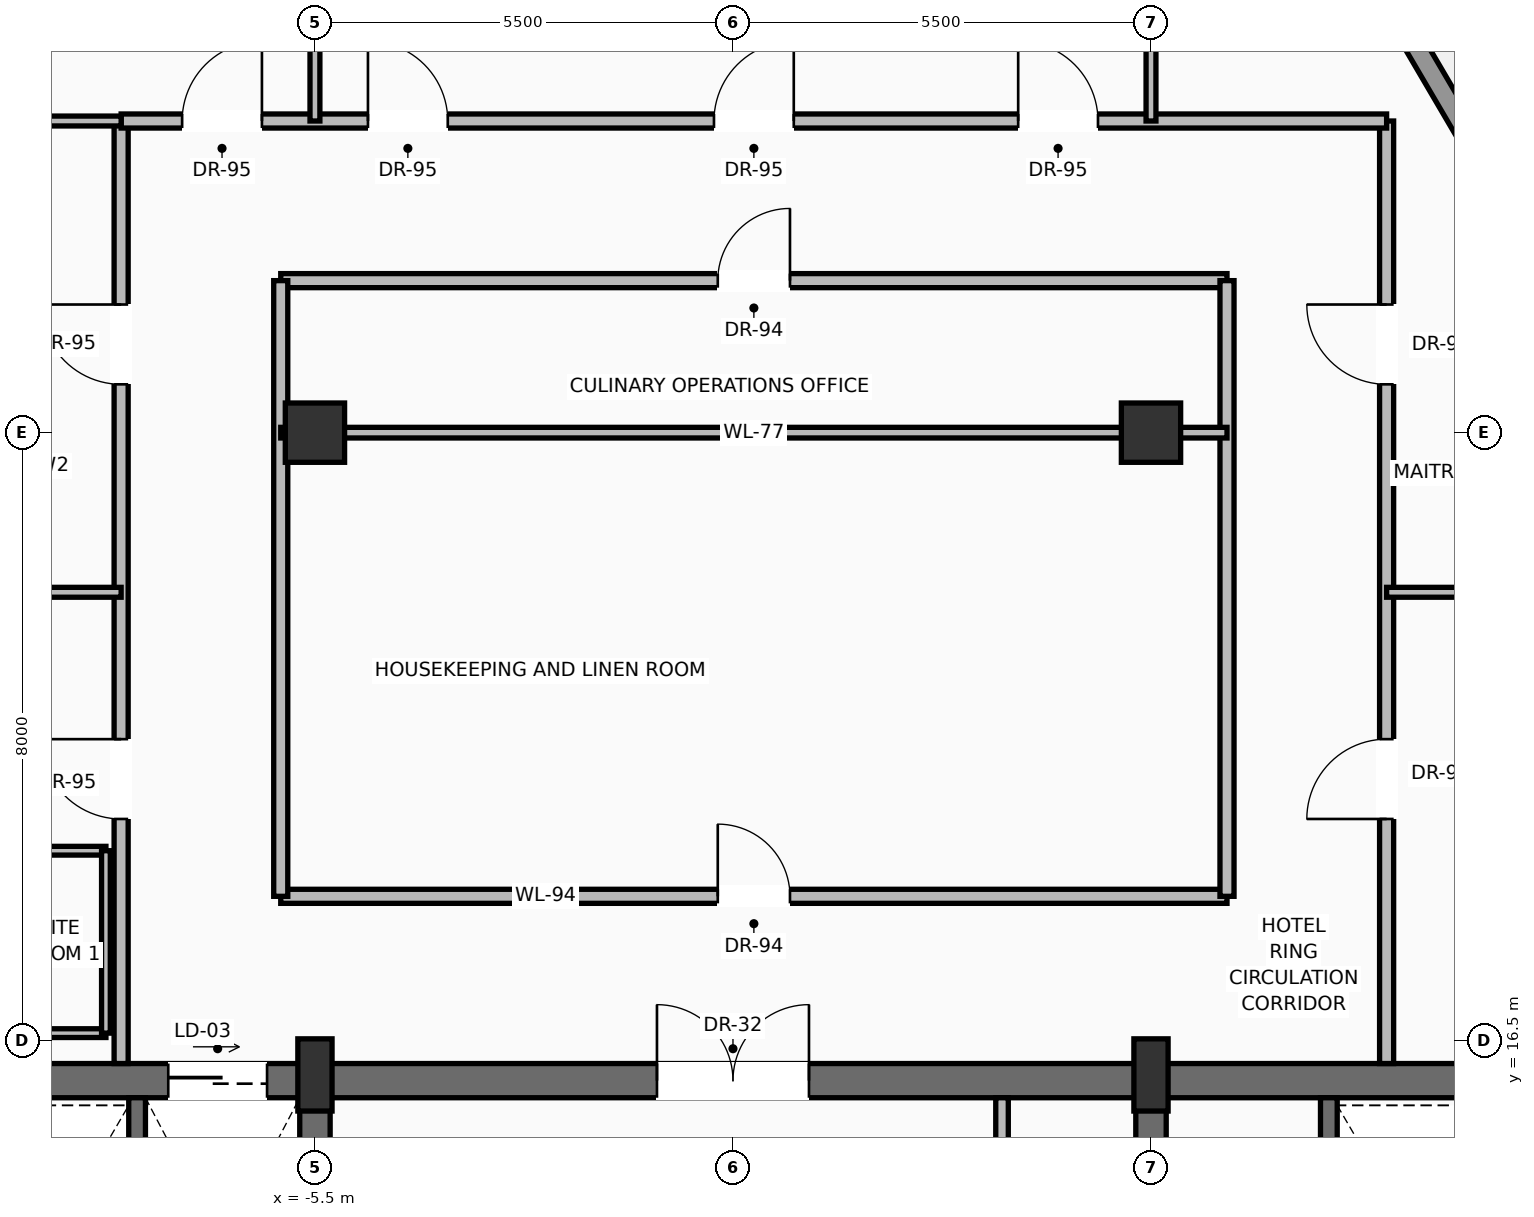
"""IFC4 building model, lengths in metres.
Left out: names, types, materials, properties, quantities, classifications, styles, units other than length and angle.
Written with IfcOpenShell. Run it as: python <this file> out.ifc"""

import sys

from ifc_helpers import new_model, si_unit, direction, frame, frame_2d, origin, origin_2d, place, context, subcontext, project, spatial, rectangle, extrude, source, transform, mapped, element, fill, save


model = new_model("IFC4")
c1 = context("Model", 3, precision=1e-05, world=origin(), true_north=direction((0.0, 1.0)))
c2 = subcontext(c1, "Body", "Model", "MODEL_VIEW")
j1 = project(units=[si_unit("LENGTHUNIT", "METRE"), si_unit("PLANEANGLEUNIT", "RADIAN")], contexts=[c1])
p1 = place(None, origin())
s1 = spatial("IfcSite", under=j1, at=p1, CompositionType="ELEMENT")
p2 = place(p1, origin())
s2 = spatial("IfcBuilding", under=s1, at=p2, CompositionType="ELEMENT")
p3 = place(p2, frame((0.0, 0.0, 283.35)))
s3 = spatial("IfcBuildingStorey", under=s2, at=p3, CompositionType="ELEMENT", Elevation=283.35)
p4 = place(p3, frame((-10.6, 15.975, 0.0), z_axis=(0.0, 0.0, 1.0), x_axis=(1.0, 0.0, 0.0)))
e1 = element("IfcWall", 1, at=p4, inside=s3, PredefinedType="SHEAR", context=c2, shape_type="SweptSolid", body=[
    extrude(rectangle(XDim=21.2, YDim=0.45, at=frame_2d((10.6, 0.0))), origin(), (0.0, 0.0, 1.0), 3.24),
])
p5 = place(p4, frame((3.17, 0.0, 0.0)))
e2 = element("IfcOpeningElement", 2, at=p5, cuts=e1, PredefinedType="OPENING", context=c2, shape_type="SweptSolid", body=[
    extrude(rectangle(XDim=1.3, YDim=2.3, at=frame_2d((0.65, 1.15))), frame((0.0, 0.235, 0.0), z_axis=(0.0, -1.0, 0.0), x_axis=(1.0, 0.0, 0.0)), (0.0, 0.0, 1.0), 0.47),
])
p6 = place(p4, frame((9.6, 0.0, 0.0)))
e3 = element("IfcOpeningElement", 3, at=p6, cuts=e1, PredefinedType="OPENING", context=c2, shape_type="SweptSolid", body=[
    extrude(rectangle(XDim=2.0, YDim=2.4, at=frame_2d((1.0, 1.2))), frame((0.0, 0.235, 0.0), z_axis=(0.0, -1.0, 0.0), x_axis=(1.0, 0.0, 0.0)), (0.0, 0.0, 1.0), 0.47),
])
p7 = place(p3, frame((-5.5, 0.625, 0.0), z_axis=(0.0, 0.0, 1.0), x_axis=(0.0, 1.0, 0.0)))
e4 = element("IfcWall", 4, at=p7, inside=s3, PredefinedType="SHEAR", context=c2, shape_type="SweptSolid", body=[
    extrude(rectangle(XDim=15.35, YDim=0.4, at=frame_2d((7.675, 0.0))), origin(), (0.0, 0.0, 1.0), 3.24),
])
p8 = place(p7, frame((8.875, 0.0, 0.0)))
e5 = element("IfcOpeningElement", 5, at=p8, cuts=e4, PredefinedType="OPENING", context=c2, shape_type="SweptSolid", body=[
    extrude(rectangle(XDim=1.1, YDim=2.2, at=frame_2d((0.55, 1.1))), frame((0.0, 0.21, 0.0), z_axis=(0.0, -1.0, 0.0), x_axis=(1.0, 0.0, 0.0)), (0.0, 0.0, 1.0), 0.42),
])
p9 = place(p3, frame((5.5, 0.625, 0.0), z_axis=(0.0, 0.0, 1.0), x_axis=(0.0, 1.0, 0.0)))
e6 = element("IfcWall", 6, at=p9, inside=s3, PredefinedType="SHEAR", context=c2, shape_type="SweptSolid", body=[
    extrude(rectangle(XDim=15.35, YDim=0.4, at=frame_2d((7.675, 0.0))), origin(), (0.0, 0.0, 1.0), 3.24),
])
p10 = place(p9, frame((8.875, 0.0, 0.0)))
e7 = element("IfcOpeningElement", 7, at=p10, cuts=e6, PredefinedType="OPENING", context=c2, shape_type="SweptSolid", body=[
    extrude(rectangle(XDim=1.1, YDim=2.2, at=frame_2d((0.55, 1.1))), frame((0.0, 0.21, 0.0), z_axis=(0.0, -1.0, 0.0), x_axis=(1.0, 0.0, 0.0)), (0.0, 0.0, 1.0), 0.42),
])
m1 = source(origin(), c2, "Body", "SweptSolid", [
    extrude(rectangle(XDim=0.45, YDim=0.95, at=origin_2d()), origin(), (0.0, 0.0, 1.0), 3.45),
])
for number, where, z_axis, x_axis in (
    (8, (-5.5, 16.05, 0.0), (0.0, 0.0, 1.0), (1.0, 0.0, 0.0)),
    (9, (5.5, 16.05, 0.0), (0.0, 0.0, 1.0), (1.0, 0.0, 0.0)),
):
    element("IfcColumn", number, at=place(p3, frame(where, z_axis=z_axis, x_axis=x_axis)), inside=s3, PredefinedType="PILASTER", context=c2, shape_type="MappedRepresentation", body=[
        mapped(m1, transform((0.0, 0.0, 0.0), scale=1.0)),
    ])
m2 = source(origin(), c2, "Body", "SweptSolid", [
    extrude(rectangle(XDim=0.78, YDim=0.78, at=origin_2d()), origin(), (0.0, 0.0, 1.0), 3.45),
])
for number, where, z_axis, x_axis in (
    (10, (-5.5, 24.5, 0.0), (0.0, 0.0, 1.0), (1.0, 0.0, 0.0)),
    (11, (5.5, 24.5, 0.0), (0.0, 0.0, 1.0), (1.0, 0.0, 0.0)),
):
    element("IfcColumn", number, at=place(p3, frame(where, z_axis=z_axis, x_axis=x_axis)), inside=s3, PredefinedType="COLUMN", context=c2, shape_type="MappedRepresentation", body=[
        mapped(m2, transform((0.0, 0.0, 0.0), scale=1.0)),
    ])
p11 = place(p3, frame((-18.245, 14.072, 0.0), z_axis=(0.0, 0.0, 1.0), x_axis=(0.499006273731, 0.866598372244, 0.0)))
e12 = element("IfcWall", 12, at=p11, inside=s3, PredefinedType="SOLIDWALL", context=c2, shape_type="SweptSolid", body=[
    extrude(rectangle(XDim=20.19, YDim=0.28, at=frame_2d((10.095, 0.0))), origin(), (0.0, 0.0, 1.0), 2.82),
])
p12 = place(p11, frame((4.846, 0.0, 0.0)))
e13 = element("IfcOpeningElement", 13, at=p12, cuts=e12, PredefinedType="OPENING", context=c2, shape_type="SweptSolid", body=[
    extrude(rectangle(XDim=1.6, YDim=2.35, at=frame_2d((0.8, 1.175))), frame((0.0, 0.15, 0.0), z_axis=(0.0, -1.0, 0.0), x_axis=(1.0, 0.0, 0.0)), (0.0, 0.0, 1.0), 0.3),
])
p13 = place(p11, frame((13.729, 0.0, 0.9)))
e14 = element("IfcOpeningElement", 14, at=p13, cuts=e12, PredefinedType="OPENING", context=c2, shape_type="SweptSolid", body=[
    extrude(rectangle(XDim=2.0, YDim=1.75, at=frame_2d((1.0, 0.875))), frame((0.0, 0.15, 0.0), z_axis=(0.0, -1.0, 0.0), x_axis=(1.0, 0.0, 0.0)), (0.0, 0.0, 1.0), 0.3),
])
p14 = place(p3, frame((7.752, 31.686, 0.0), z_axis=(0.0, 0.0, 1.0), x_axis=(0.506132125438, -0.862455953426, 0.0)))
e15 = element("IfcWall", 15, at=p14, inside=s3, PredefinedType="SOLIDWALL", context=c2, shape_type="SweptSolid", body=[
    extrude(rectangle(XDim=20.071, YDim=0.28, at=frame_2d((10.036, 0.0))), origin(), (0.0, 0.0, 1.0), 2.82),
])
p15 = place(p14, frame((4.817, 0.0, 0.0)))
e16 = element("IfcOpeningElement", 16, at=p15, cuts=e15, PredefinedType="OPENING", context=c2, shape_type="SweptSolid", body=[
    extrude(rectangle(XDim=1.6, YDim=2.35, at=frame_2d((0.8, 1.175))), frame((0.0, 0.15, 0.0), z_axis=(0.0, -1.0, 0.0), x_axis=(1.0, 0.0, 0.0)), (0.0, 0.0, 1.0), 0.3),
])
p16 = place(p14, frame((13.648, 0.0, 0.9)))
e17 = element("IfcOpeningElement", 17, at=p16, cuts=e15, PredefinedType="OPENING", context=c2, shape_type="SweptSolid", body=[
    extrude(rectangle(XDim=2.0, YDim=1.75, at=frame_2d((1.0, 0.875))), frame((0.0, 0.15, 0.0), z_axis=(0.0, -1.0, 0.0), x_axis=(1.0, 0.0, 0.0)), (0.0, 0.0, 1.0), 0.3),
])
for number, where, z_axis, x_axis in (
    (18, (-7.84, 11.87, 0.0), (0.0, 0.0, 1.0), (0.0, 1.0, 0.0)),
    (19, (7.84, 11.87, 0.0), (0.0, 0.0, 1.0), (0.0, 1.0, 0.0)),
):
    element("IfcWall", number, at=place(p3, frame(where, z_axis=z_axis, x_axis=x_axis)), inside=s3, PredefinedType="SOLIDWALL", context=c2, shape_type="SweptSolid", body=[
        extrude(rectangle(XDim=3.88, YDim=0.22, at=frame_2d((1.94, 0.0))), origin(), (0.0, 0.0, 1.0), 3.24),
    ])
p17 = place(p3, frame((3.54, 11.22, 0.0), z_axis=(0.0, 0.0, 1.0), x_axis=(0.0, 1.0, 0.0)))
e20 = element("IfcWall", 20, at=p17, inside=s3, PredefinedType="PARTITIONING", context=c2, shape_type="SweptSolid", body=[
    extrude(rectangle(XDim=4.53, YDim=0.165, at=frame_2d((2.265, 0.0))), origin(), (0.0, 0.0, 1.0), 3.232),
])
p18 = place(p17, frame((1.25, 0.0, 0.0)))
e21 = element("IfcOpeningElement", 21, at=p18, cuts=e20, PredefinedType="OPENING", context=c2, shape_type="SweptSolid", body=[
    extrude(rectangle(XDim=0.9, YDim=2.1, at=frame_2d((0.45, 1.05))), frame((0.0, 0.093, 0.0), z_axis=(0.0, -1.0, 0.0), x_axis=(1.0, 0.0, 0.0)), (0.0, 0.0, 1.0), 0.185),
])
p19 = place(p3, frame((-5.95, 18.4, 0.0), z_axis=(0.0, 0.0, 1.0), x_axis=(1.0, 0.0, 0.0)))
e22 = element("IfcWall", 22, at=p19, inside=s3, PredefinedType="PARTITIONING", context=c2, shape_type="SweptSolid", body=[
    extrude(rectangle(XDim=12.45, YDim=0.185, at=frame_2d((6.225, 0.0))), origin(), (0.0, 0.0, 1.0), 3.232),
])
p20 = place(p19, frame((5.75, 0.0, 0.0)))
e23 = element("IfcOpeningElement", 23, at=p20, cuts=e22, PredefinedType="OPENING", context=c2, shape_type="SweptSolid", body=[
    extrude(rectangle(XDim=0.95, YDim=2.2, at=frame_2d((0.475, 1.1))), frame((0.0, 0.103, 0.0), z_axis=(0.0, -1.0, 0.0), x_axis=(1.0, 0.0, 0.0)), (0.0, 0.0, 1.0), 0.205),
])
p21 = place(p3, frame((-5.95, 26.5, 0.0), z_axis=(0.0, 0.0, 1.0), x_axis=(1.0, 0.0, 0.0)))
e24 = element("IfcWall", 24, at=p21, inside=s3, PredefinedType="PARTITIONING", context=c2, shape_type="SweptSolid", body=[
    extrude(rectangle(XDim=12.45, YDim=0.185, at=frame_2d((6.225, 0.0))), origin(), (0.0, 0.0, 1.0), 3.232),
])
p22 = place(p21, frame((5.75, 0.0, 0.0)))
e25 = element("IfcOpeningElement", 25, at=p22, cuts=e24, PredefinedType="OPENING", context=c2, shape_type="SweptSolid", body=[
    extrude(rectangle(XDim=0.95, YDim=2.2, at=frame_2d((0.475, 1.1))), frame((0.0, 0.103, 0.0), z_axis=(0.0, -1.0, 0.0), x_axis=(1.0, 0.0, 0.0)), (0.0, 0.0, 1.0), 0.205),
])
for number, where, z_axis, x_axis in (
    (26, (-5.95, 18.4, 0.0), (0.0, 0.0, 1.0), (0.0, 1.0, 0.0)),
    (27, (6.5, 18.4, 0.0), (0.0, 0.0, 1.0), (0.0, 1.0, 0.0)),
):
    element("IfcWall", number, at=place(p3, frame(where, z_axis=z_axis, x_axis=x_axis)), inside=s3, PredefinedType="PARTITIONING", context=c2, shape_type="SweptSolid", body=[
        extrude(rectangle(XDim=8.1, YDim=0.185, at=frame_2d((4.05, 0.0))), origin(), (0.0, 0.0, 1.0), 3.232),
    ])
p23 = place(p3, frame((-8.05, 16.2, 0.0), z_axis=(0.0, 0.0, 1.0), x_axis=(0.0, 1.0, 0.0)))
e28 = element("IfcWall", 28, at=p23, inside=s3, PredefinedType="PARTITIONING", context=c2, shape_type="SweptSolid", body=[
    extrude(rectangle(XDim=12.4, YDim=0.185, at=frame_2d((6.2, 0.0))), origin(), (0.0, 0.0, 1.0), 3.232),
])
p24 = place(p23, frame((3.218, 0.0, 0.0)))
e29 = element("IfcOpeningElement", 29, at=p24, cuts=e28, PredefinedType="OPENING", context=c2, shape_type="SweptSolid", body=[
    extrude(rectangle(XDim=1.05, YDim=2.25, at=frame_2d((0.525, 1.125))), frame((0.0, 0.103, 0.0), z_axis=(0.0, -1.0, 0.0), x_axis=(1.0, 0.0, 0.0)), (0.0, 0.0, 1.0), 0.205),
])
p25 = place(p23, frame((8.936, 0.0, 0.0)))
e30 = element("IfcOpeningElement", 30, at=p25, cuts=e28, PredefinedType="OPENING", context=c2, shape_type="SweptSolid", body=[
    extrude(rectangle(XDim=1.05, YDim=2.25, at=frame_2d((0.525, 1.125))), frame((0.0, 0.103, 0.0), z_axis=(0.0, -1.0, 0.0), x_axis=(1.0, 0.0, 0.0)), (0.0, 0.0, 1.0), 0.205),
])
p26 = place(p3, frame((8.6, 16.2, 0.0), z_axis=(0.0, 0.0, 1.0), x_axis=(0.0, 1.0, 0.0)))
e31 = element("IfcWall", 31, at=p26, inside=s3, PredefinedType="PARTITIONING", context=c2, shape_type="SweptSolid", body=[
    extrude(rectangle(XDim=12.4, YDim=0.185, at=frame_2d((6.2, 0.0))), origin(), (0.0, 0.0, 1.0), 3.232),
])
p27 = place(p26, frame((3.218, 0.0, 0.0)))
e32 = element("IfcOpeningElement", 32, at=p27, cuts=e31, PredefinedType="OPENING", context=c2, shape_type="SweptSolid", body=[
    extrude(rectangle(XDim=1.05, YDim=2.25, at=frame_2d((0.525, 1.125))), frame((0.0, 0.103, 0.0), z_axis=(0.0, -1.0, 0.0), x_axis=(1.0, 0.0, 0.0)), (0.0, 0.0, 1.0), 0.205),
])
p28 = place(p26, frame((8.936, 0.0, 0.0)))
e33 = element("IfcOpeningElement", 33, at=p28, cuts=e31, PredefinedType="OPENING", context=c2, shape_type="SweptSolid", body=[
    extrude(rectangle(XDim=1.05, YDim=2.25, at=frame_2d((0.525, 1.125))), frame((0.0, 0.103, 0.0), z_axis=(0.0, -1.0, 0.0), x_axis=(1.0, 0.0, 0.0)), (0.0, 0.0, 1.0), 0.205),
])
p29 = place(p3, frame((-8.05, 28.6, 0.0), z_axis=(0.0, 0.0, 1.0), x_axis=(1.0, 0.0, 0.0)))
e34 = element("IfcWall", 34, at=p29, inside=s3, PredefinedType="PARTITIONING", context=c2, shape_type="SweptSolid", body=[
    extrude(rectangle(XDim=16.65, YDim=0.185, at=frame_2d((8.325, 0.0))), origin(), (0.0, 0.0, 1.0), 3.232),
])
p30 = place(p29, frame((3.248, 0.0, 0.0)))
e35 = element("IfcOpeningElement", 35, at=p30, cuts=e34, PredefinedType="OPENING", context=c2, shape_type="SweptSolid", body=[
    extrude(rectangle(XDim=1.05, YDim=2.25, at=frame_2d((0.525, 1.125))), frame((0.0, 0.103, 0.0), z_axis=(0.0, -1.0, 0.0), x_axis=(1.0, 0.0, 0.0)), (0.0, 0.0, 1.0), 0.205),
])
p31 = place(p29, frame((7.8, 0.0, 0.0)))
e36 = element("IfcOpeningElement", 36, at=p31, cuts=e34, PredefinedType="OPENING", context=c2, shape_type="SweptSolid", body=[
    extrude(rectangle(XDim=1.05, YDim=2.25, at=frame_2d((0.525, 1.125))), frame((0.0, 0.103, 0.0), z_axis=(0.0, -1.0, 0.0), x_axis=(1.0, 0.0, 0.0)), (0.0, 0.0, 1.0), 0.205),
])
p32 = place(p29, frame((11.802, 0.0, 0.0)))
e37 = element("IfcOpeningElement", 37, at=p32, cuts=e34, PredefinedType="OPENING", context=c2, shape_type="SweptSolid", body=[
    extrude(rectangle(XDim=1.05, YDim=2.25, at=frame_2d((0.525, 1.125))), frame((0.0, 0.103, 0.0), z_axis=(0.0, -1.0, 0.0), x_axis=(1.0, 0.0, 0.0)), (0.0, 0.0, 1.0), 0.205),
])
p33 = place(p29, frame((0.802, 0.0, 0.0)))
e38 = element("IfcOpeningElement", 38, at=p33, cuts=e34, PredefinedType="OPENING", context=c2, shape_type="SweptSolid", body=[
    extrude(rectangle(XDim=1.05, YDim=2.25, at=frame_2d((0.525, 1.125))), frame((0.0, 0.103, 0.0), z_axis=(0.0, -1.0, 0.0), x_axis=(1.0, 0.0, 0.0)), (0.0, 0.0, 1.0), 0.205),
])
p34 = place(p3, frame((-5.95, 24.5, 0.0), z_axis=(0.0, 0.0, 1.0), x_axis=(1.0, 0.0, 0.0)))
e39 = element("IfcWall", 39, at=p34, inside=s3, PredefinedType="PARTITIONING", context=c2, shape_type="SweptSolid", body=[
    extrude(rectangle(XDim=12.45, YDim=0.14, at=frame_2d((6.225, 0.0))), origin(), (0.0, 0.0, 1.0), 2.683),
])
p35 = place(p3, frame((-10.029, 28.6, 0.0), z_axis=(0.0, 0.0, 1.0), x_axis=(1.0, 0.0, 0.0)))
e40 = element("IfcWall", 40, at=p35, inside=s3, PredefinedType="PARTITIONING", context=c2, shape_type="SweptSolid", body=[
    extrude(rectangle(XDim=1.979, YDim=0.13, at=frame_2d((0.989, 0.0))), origin(), (0.0, 0.0, 1.0), 3.232),
])
p36 = place(p3, frame((-5.5, 28.6, 0.0), z_axis=(0.0, 0.0, 1.0), x_axis=(0.0, 1.0, 0.0)))
e41 = element("IfcWall", 41, at=p36, inside=s3, PredefinedType="PARTITIONING", context=c2, shape_type="SweptSolid", body=[
    extrude(rectangle(XDim=7.865, YDim=0.13, at=frame_2d((3.932, 0.0))), origin(), (0.0, 0.0, 1.0), 2.683),
])
p37 = place(p3, frame((5.5, 28.6, 0.0), z_axis=(0.0, 0.0, 1.0), x_axis=(0.0, 1.0, 0.0)))
e42 = element("IfcWall", 42, at=p37, inside=s3, PredefinedType="PARTITIONING", context=c2, shape_type="SweptSolid", body=[
    extrude(rectangle(XDim=7.18, YDim=0.13, at=frame_2d((3.59, 0.0))), origin(), (0.0, 0.0, 1.0), 2.683),
])
for number, where, z_axis, x_axis in (
    (43, (-10.9, 16.6, 0.0), (0.0, 0.0, 1.0), (1.0, 0.0, 0.0)),
    (44, (-10.9, 19.0, 0.0), (0.0, 0.0, 1.0), (1.0, 0.0, 0.0)),
):
    element("IfcWall", number, at=place(p3, frame(where, z_axis=z_axis, x_axis=x_axis)), inside=s3, PredefinedType="PARTITIONING", context=c2, shape_type="SweptSolid", body=[
        extrude(rectangle(XDim=2.65, YDim=0.115, at=frame_2d((1.325, 0.0))), origin(), (0.0, 0.0, 1.0), 3.232),
    ])
p38 = place(p3, frame((-8.25, 16.6, 0.0), z_axis=(0.0, 0.0, 1.0), x_axis=(0.0, 1.0, 0.0)))
e45 = element("IfcWall", 45, at=p38, inside=s3, PredefinedType="PARTITIONING", context=c2, shape_type="SweptSolid", body=[
    extrude(rectangle(XDim=2.4, YDim=0.115, at=frame_2d((1.2, 0.0))), origin(), (0.0, 0.0, 1.0), 3.232),
])
p39 = place(p3, frame((-13.599, 22.4, 0.0), z_axis=(0.0, 0.0, 1.0), x_axis=(1.0, 0.0, 0.0)))
e46 = element("IfcWall", 46, at=p39, inside=s3, PredefinedType="PARTITIONING", context=c2, shape_type="SweptSolid", body=[
    extrude(rectangle(XDim=5.549, YDim=0.13, at=frame_2d((2.774, 0.0))), origin(), (0.0, 0.0, 1.0), 3.232),
])
p40 = place(p3, frame((8.6, 22.4, 0.0), z_axis=(0.0, 0.0, 1.0), x_axis=(1.0, 0.0, 0.0)))
e47 = element("IfcWall", 47, at=p40, inside=s3, PredefinedType="PARTITIONING", context=c2, shape_type="SweptSolid", body=[
    extrude(rectangle(XDim=4.752, YDim=0.13, at=frame_2d((2.376, 0.0))), origin(), (0.0, 0.0, 1.0), 3.232),
])
m3 = source(origin(), c2, "Body", "SweptSolid", [
    extrude(rectangle(XDim=1.3, YDim=2.3, at=frame_2d((0.65, 1.15))), frame((0.0, 0.025, 0.0), z_axis=(0.0, -1.0, 0.0), x_axis=(1.0, 0.0, 0.0)), (0.0, 0.0, 1.0), 0.05),
])
p41 = place(p5, origin())
e48 = element("IfcDoor", 48, at=p41, inside=s3, OperationType="SLIDING_TO_RIGHT", PredefinedType="DOOR", context=c2, shape_type="MappedRepresentation", body=[
    mapped(m3, transform((0.0, 0.0, 0.0), scale=1.0)),
])
fill(e2, e48)
m4 = source(origin(), c2, "Body", "SweptSolid", [
    extrude(rectangle(XDim=2.0, YDim=2.4, at=frame_2d((1.0, 1.2))), frame((0.0, 0.025, 0.0), z_axis=(0.0, -1.0, 0.0), x_axis=(1.0, 0.0, 0.0)), (0.0, 0.0, 1.0), 0.05),
])
p42 = place(p6, origin())
e49 = element("IfcDoor", 49, at=p42, inside=s3, OperationType="DOUBLE_DOOR_SINGLE_SWING", PredefinedType="DOOR", context=c2, shape_type="MappedRepresentation", body=[
    mapped(m4, transform((0.0, 0.0, 0.0), scale=1.0)),
])
fill(e3, e49)
m5 = source(origin(), c2, "Body", "SweptSolid", [
    extrude(rectangle(XDim=0.95, YDim=2.2, at=frame_2d((0.475, 1.1))), frame((0.0, 0.025, 0.0), z_axis=(0.0, -1.0, 0.0), x_axis=(1.0, 0.0, 0.0)), (0.0, 0.0, 1.0), 0.05),
])
p43 = place(p20, origin())
e50 = element("IfcDoor", 50, at=p43, inside=s3, OperationType="SINGLE_SWING_LEFT", PredefinedType="DOOR", context=c2, shape_type="MappedRepresentation", body=[
    mapped(m5, transform((0.0, 0.0, 0.0), scale=1.0)),
])
fill(e23, e50)
p44 = place(p22, origin())
e51 = element("IfcDoor", 51, at=p44, inside=s3, OperationType="SINGLE_SWING_RIGHT", PredefinedType="DOOR", context=c2, shape_type="MappedRepresentation", body=[
    mapped(m5, transform((0.0, 0.0, 0.0), scale=1.0)),
])
fill(e25, e51)
m6 = source(origin(), c2, "Body", "SweptSolid", [
    extrude(rectangle(XDim=1.05, YDim=2.25, at=frame_2d((0.525, 1.125))), frame((0.0, 0.025, 0.0), z_axis=(0.0, -1.0, 0.0), x_axis=(1.0, 0.0, 0.0)), (0.0, 0.0, 1.0), 0.05),
])
p45 = place(p24, origin())
e52 = element("IfcDoor", 52, at=p45, inside=s3, OperationType="SINGLE_SWING_RIGHT", PredefinedType="DOOR", context=c2, shape_type="MappedRepresentation", body=[
    mapped(m6, transform((0.0, 0.0, 0.0), scale=1.0)),
])
fill(e29, e52)
p46 = place(p25, origin())
e53 = element("IfcDoor", 53, at=p46, inside=s3, OperationType="SINGLE_SWING_RIGHT", PredefinedType="DOOR", context=c2, shape_type="MappedRepresentation", body=[
    mapped(m6, transform((0.0, 0.0, 0.0), scale=1.0)),
])
fill(e30, e53)
p47 = place(p27, origin())
e54 = element("IfcDoor", 54, at=p47, inside=s3, OperationType="SINGLE_SWING_LEFT", PredefinedType="DOOR", context=c2, shape_type="MappedRepresentation", body=[
    mapped(m6, transform((0.0, 0.0, 0.0), scale=1.0)),
])
fill(e32, e54)
p48 = place(p28, origin())
e55 = element("IfcDoor", 55, at=p48, inside=s3, OperationType="SINGLE_SWING_RIGHT", PredefinedType="DOOR", context=c2, shape_type="MappedRepresentation", body=[
    mapped(m6, transform((0.0, 0.0, 0.0), scale=1.0)),
])
fill(e33, e55)
p49 = place(p30, origin())
e56 = element("IfcDoor", 56, at=p49, inside=s3, OperationType="SINGLE_SWING_LEFT", PredefinedType="DOOR", context=c2, shape_type="MappedRepresentation", body=[
    mapped(m6, transform((0.0, 0.0, 0.0), scale=1.0)),
])
fill(e35, e56)
p50 = place(p31, origin())
e57 = element("IfcDoor", 57, at=p50, inside=s3, OperationType="SINGLE_SWING_RIGHT", PredefinedType="DOOR", context=c2, shape_type="MappedRepresentation", body=[
    mapped(m6, transform((0.0, 0.0, 0.0), scale=1.0)),
])
fill(e36, e57)
p51 = place(p32, origin())
e58 = element("IfcDoor", 58, at=p51, inside=s3, OperationType="SINGLE_SWING_LEFT", PredefinedType="DOOR", context=c2, shape_type="MappedRepresentation", body=[
    mapped(m6, transform((0.0, 0.0, 0.0), scale=1.0)),
])
fill(e37, e58)
p52 = place(p33, origin())
e59 = element("IfcDoor", 59, at=p52, inside=s3, OperationType="SINGLE_SWING_RIGHT", PredefinedType="DOOR", context=c2, shape_type="MappedRepresentation", body=[
    mapped(m6, transform((0.0, 0.0, 0.0), scale=1.0)),
])
fill(e38, e59)
save(model, sys.argv[1])
